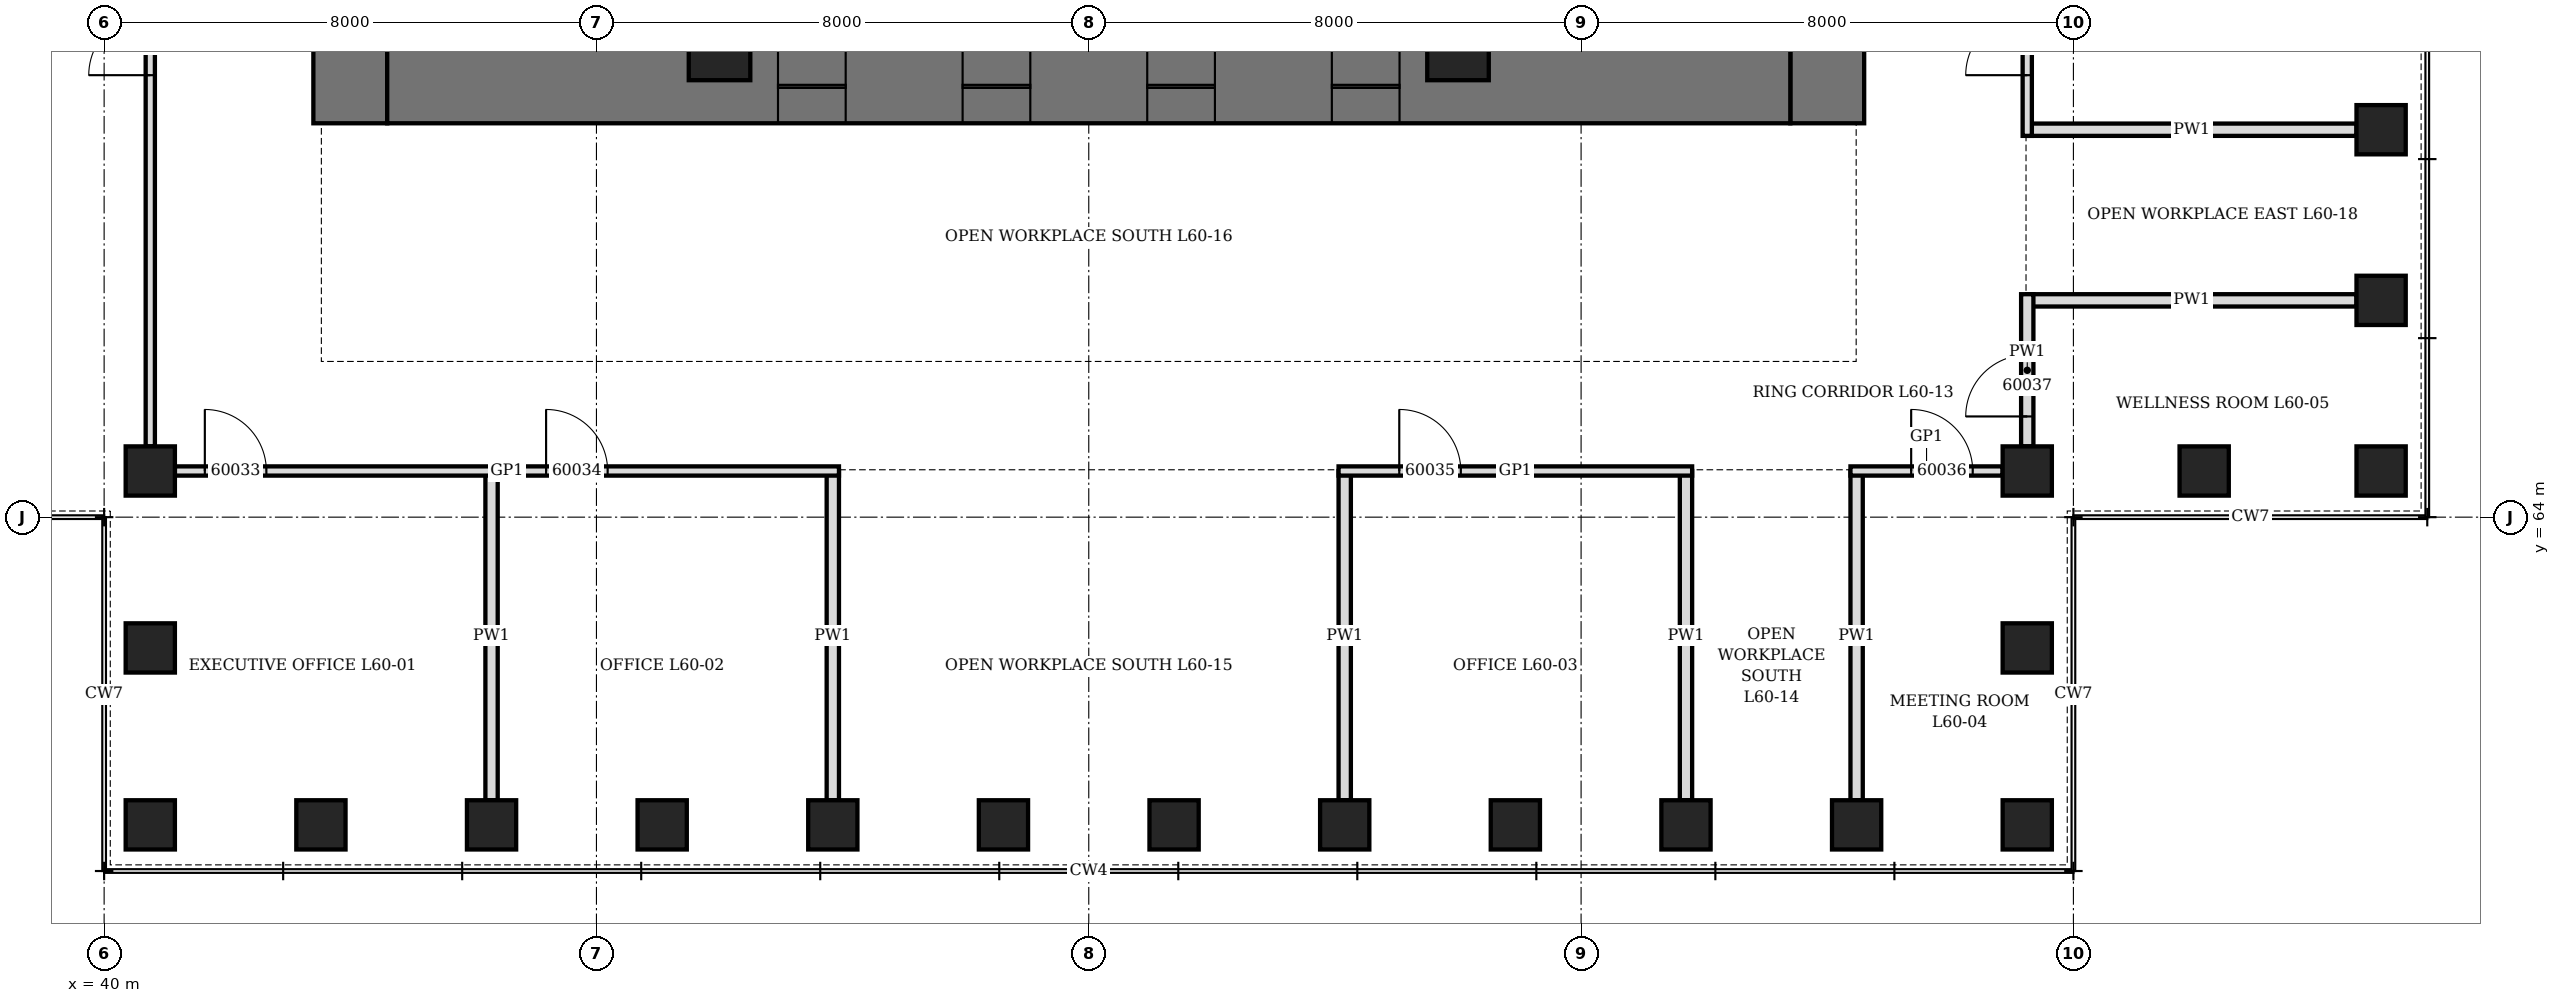
"""IFC4 building model, lengths in metres.
Left out: names, types, materials, properties, quantities, classifications, styles, units other than length and angle.
Written with IfcOpenShell. Run it as: python <this file> out.ifc"""

import sys

from ifc_helpers import new_model, si_unit, direction, frame, frame_2d, origin, origin_2d, place, context, subcontext, project, spatial, rectangle, hollow_rectangle, extrude, element, fill, save


model = new_model("IFC4")
c1 = context("Model", 3, precision=1e-05, world=origin(), true_north=direction((0.0, 1.0)))
c2 = subcontext(c1, "Body", "Model", "MODEL_VIEW")
j1 = project(units=[si_unit("LENGTHUNIT", "METRE"), si_unit("PLANEANGLEUNIT", "RADIAN")], contexts=[c1])
p1 = place(None, origin())
s1 = spatial("IfcSite", under=j1, at=p1, CompositionType="ELEMENT")
p2 = place(p1, origin())
s2 = spatial("IfcBuilding", under=s1, at=p2, CompositionType="ELEMENT")
p3 = place(p2, frame((0.0, 0.0, 267.1)))
s3 = spatial("IfcBuildingStorey", under=s2, at=p3, CompositionType="ELEMENT", Elevation=267.1)
for number, where, z_axis, x_axis in (
    (1, (40.75, 59.0, 0.0), (0.0, 0.0, 1.0), (1.0, 0.0, 0.0)),
    (2, (43.523, 59.0, 0.0), (0.0, 0.0, 1.0), (1.0, 0.0, 0.0)),
    (3, (46.295, 59.0, 0.0), (0.0, 0.0, 1.0), (1.0, 0.0, 0.0)),
    (4, (49.068, 59.0, 0.0), (0.0, 0.0, 1.0), (1.0, 0.0, 0.0)),
    (5, (51.841, 59.0, 0.0), (0.0, 0.0, 1.0), (1.0, 0.0, 0.0)),
    (6, (54.614, 59.0, 0.0), (0.0, 0.0, 1.0), (1.0, 0.0, 0.0)),
    (7, (57.386, 59.0, 0.0), (0.0, 0.0, 1.0), (1.0, 0.0, 0.0)),
    (8, (60.159, 59.0, 0.0), (0.0, 0.0, 1.0), (1.0, 0.0, 0.0)),
    (9, (62.932, 59.0, 0.0), (0.0, 0.0, 1.0), (1.0, 0.0, 0.0)),
    (10, (65.705, 59.0, 0.0), (0.0, 0.0, 1.0), (1.0, 0.0, 0.0)),
    (11, (68.477, 59.0, 0.0), (0.0, 0.0, 1.0), (1.0, 0.0, 0.0)),
    (12, (71.25, 59.0, 0.0), (0.0, 0.0, 1.0), (0.0, 1.0, 0.0)),
    (13, (71.25, 61.875, 0.0), (0.0, 0.0, 1.0), (0.0, 1.0, 0.0)),
    (14, (71.25, 64.75, 0.0), (0.0, 0.0, 1.0), (1.0, 0.0, 0.0)),
    (15, (74.125, 64.75, 0.0), (0.0, 0.0, 1.0), (1.0, 0.0, 0.0)),
    (16, (77.0, 64.75, 0.0), (0.0, 0.0, 1.0), (0.0, 1.0, 0.0)),
    (17, (77.0, 67.523, 0.0), (0.0, 0.0, 1.0), (0.0, 1.0, 0.0)),
    (18, (77.0, 70.295, 0.0), (0.0, 0.0, 1.0), (0.0, 1.0, 0.0)),
    (19, (40.75, 64.75, 0.0), (0.0, 0.0, 1.0), (0.0, 1.0, 0.0)),
    (20, (40.75, 61.875, 0.0), (0.0, 0.0, 1.0), (0.0, 1.0, 0.0)),
):
    element("IfcColumn", number, at=place(p3, frame(where, z_axis=z_axis, x_axis=x_axis)), inside=s3, PredefinedType="COLUMN", context=c2, shape_type="SweptSolid", body=[
        extrude(hollow_rectangle(XDim=0.8, YDim=0.8, WallThickness=0.1, at=origin_2d()), origin(), (0.0, 0.0, 1.0), 4.2),
    ])
p4 = place(p3, frame((44.0, 70.4, 0.0), z_axis=(0.0, 0.0, 1.0), x_axis=(0.0, 1.0, 0.0)))
e21 = element("IfcWall", 21, at=p4, inside=s3, PredefinedType="SHEAR", context=c2, shape_type="SweptSolid", body=[
    extrude(rectangle(XDim=19.2, YDim=1.2, at=frame_2d((9.6, 0.0))), origin(), (0.0, 0.0, 1.0), 4.2),
])
p5 = place(p4, frame((8.6, 0.0, 0.0)))
e22 = element("IfcOpeningElement", 22, at=p5, cuts=e21, PredefinedType="OPENING", context=c2, shape_type="SweptSolid", body=[
    extrude(rectangle(XDim=2.0, YDim=2.4, at=frame_2d((1.0, 1.2))), frame((0.0, 0.61, 0.0), z_axis=(0.0, -1.0, 0.0), x_axis=(1.0, 0.0, 0.0)), (0.0, 0.0, 1.0), 1.22),
])
p6 = place(p3, frame((68.0, 70.4, 0.0), z_axis=(0.0, 0.0, 1.0), x_axis=(0.0, 1.0, 0.0)))
e23 = element("IfcWall", 23, at=p6, inside=s3, PredefinedType="SHEAR", context=c2, shape_type="SweptSolid", body=[
    extrude(rectangle(XDim=19.2, YDim=1.2, at=frame_2d((9.6, 0.0))), origin(), (0.0, 0.0, 1.0), 4.2),
])
p7 = place(p6, frame((8.6, 0.0, 0.0)))
e24 = element("IfcOpeningElement", 24, at=p7, cuts=e23, PredefinedType="OPENING", context=c2, shape_type="SweptSolid", body=[
    extrude(rectangle(XDim=2.0, YDim=2.4, at=frame_2d((1.0, 1.2))), frame((0.0, 0.61, 0.0), z_axis=(0.0, -1.0, 0.0), x_axis=(1.0, 0.0, 0.0)), (0.0, 0.0, 1.0), 1.22),
])
p8 = place(p3, frame((44.6, 71.0, 0.0), z_axis=(0.0, 0.0, 1.0), x_axis=(1.0, 0.0, 0.0)))
e25 = element("IfcWall", 25, at=p8, inside=s3, PredefinedType="SHEAR", context=c2, shape_type="SweptSolid", body=[
    extrude(rectangle(XDim=22.8, YDim=1.2, at=frame_2d((11.4, 0.0))), origin(), (0.0, 0.0, 1.0), 4.2),
])
p9 = place(p8, frame((6.35, 0.0, 0.0)))
e26 = element("IfcOpeningElement", 26, at=p9, cuts=e25, PredefinedType="OPENING", context=c2, shape_type="SweptSolid", body=[
    extrude(rectangle(XDim=1.1, YDim=2.2, at=frame_2d((0.55, 1.1))), frame((0.0, 0.61, 0.0), z_axis=(0.0, -1.0, 0.0), x_axis=(1.0, 0.0, 0.0)), (0.0, 0.0, 1.0), 1.22),
])
p10 = place(p8, frame((9.35, 0.0, 0.0)))
e27 = element("IfcOpeningElement", 27, at=p10, cuts=e25, PredefinedType="OPENING", context=c2, shape_type="SweptSolid", body=[
    extrude(rectangle(XDim=1.1, YDim=2.2, at=frame_2d((0.55, 1.1))), frame((0.0, 0.61, 0.0), z_axis=(0.0, -1.0, 0.0), x_axis=(1.0, 0.0, 0.0)), (0.0, 0.0, 1.0), 1.22),
])
p11 = place(p8, frame((12.35, 0.0, 0.0)))
e28 = element("IfcOpeningElement", 28, at=p11, cuts=e25, PredefinedType="OPENING", context=c2, shape_type="SweptSolid", body=[
    extrude(rectangle(XDim=1.1, YDim=2.2, at=frame_2d((0.55, 1.1))), frame((0.0, 0.61, 0.0), z_axis=(0.0, -1.0, 0.0), x_axis=(1.0, 0.0, 0.0)), (0.0, 0.0, 1.0), 1.22),
])
p12 = place(p8, frame((15.35, 0.0, 0.0)))
e29 = element("IfcOpeningElement", 29, at=p12, cuts=e25, PredefinedType="OPENING", context=c2, shape_type="SweptSolid", body=[
    extrude(rectangle(XDim=1.1, YDim=2.2, at=frame_2d((0.55, 1.1))), frame((0.0, 0.61, 0.0), z_axis=(0.0, -1.0, 0.0), x_axis=(1.0, 0.0, 0.0)), (0.0, 0.0, 1.0), 1.22),
])
for number, where, z_axis, x_axis in (
    (30, (50.0, 71.6, 0.0), (0.0, 0.0, 1.0), (1.0, 0.0, 0.0)),
    (31, (62.0, 71.6, 0.0), (0.0, 0.0, 1.0), (1.0, 0.0, 0.0)),
):
    element("IfcColumn", number, at=place(p3, frame(where, z_axis=z_axis, x_axis=x_axis)), inside=s3, PredefinedType="COLUMN", context=c2, shape_type="SweptSolid", body=[
        extrude(hollow_rectangle(XDim=1.0, YDim=1.0, WallThickness=0.15, at=origin_2d()), origin(), (0.0, 0.0, 1.0), 4.2),
    ])
for number, where, z_axis, x_axis in (
    (32, (46.295, 59.4, 0.0), (0.0, 0.0, 1.0), (0.0, 1.0, 0.0)),
    (33, (51.841, 59.4, 0.0), (0.0, 0.0, 1.0), (0.0, 1.0, 0.0)),
    (34, (60.159, 59.4, 0.0), (0.0, 0.0, 1.0), (0.0, 1.0, 0.0)),
    (35, (65.705, 59.4, 0.0), (0.0, 0.0, 1.0), (0.0, 1.0, 0.0)),
    (36, (68.477, 59.4, 0.0), (0.0, 0.0, 1.0), (0.0, 1.0, 0.0)),
    (37, (71.25, 67.523, 0.0), (0.0, 0.0, 1.0), (1.0, 0.0, 0.0)),
    (38, (71.25, 70.295, 0.0), (0.0, 0.0, 1.0), (1.0, 0.0, 0.0)),
):
    element("IfcWall", number, at=place(p3, frame(where, z_axis=z_axis, x_axis=x_axis)), inside=s3, PredefinedType="PARTITIONING", context=c2, shape_type="SweptSolid", body=[
        extrude(rectangle(XDim=5.35, YDim=0.2, at=frame_2d((2.675, 0.0))), origin(), (0.0, 0.0, 1.0), 3.428),
    ])
p13 = place(p3, frame((41.15, 64.75, 0.0), z_axis=(0.0, 0.0, 1.0), x_axis=(1.0, 0.0, 0.0)))
e39 = element("IfcWall", 39, at=p13, inside=s3, PredefinedType="PARTITIONING", context=c2, shape_type="SweptSolid", body=[
    extrude(rectangle(XDim=10.791, YDim=0.15, at=frame_2d((5.396, 0.0))), origin(), (0.0, 0.0, 1.0), 4.04),
])
p14 = place(p13, frame((0.486, 0.0, 0.0)))
e40 = element("IfcOpeningElement", 40, at=p14, cuts=e39, PredefinedType="OPENING", context=c2, shape_type="SweptSolid", body=[
    extrude(rectangle(XDim=1.0, YDim=2.1, at=frame_2d((0.5, 1.05))), frame((0.0, 0.085, 0.0), z_axis=(0.0, -1.0, 0.0), x_axis=(1.0, 0.0, 0.0)), (0.0, 0.0, 1.0), 0.17),
])
p15 = place(p13, frame((6.032, 0.0, 0.0)))
e41 = element("IfcOpeningElement", 41, at=p15, cuts=e39, PredefinedType="OPENING", context=c2, shape_type="SweptSolid", body=[
    extrude(rectangle(XDim=1.0, YDim=2.1, at=frame_2d((0.5, 1.05))), frame((0.0, 0.085, 0.0), z_axis=(0.0, -1.0, 0.0), x_axis=(1.0, 0.0, 0.0)), (0.0, 0.0, 1.0), 0.17),
])
p16 = place(p3, frame((60.059, 64.75, 0.0), z_axis=(0.0, 0.0, 1.0), x_axis=(1.0, 0.0, 0.0)))
e42 = element("IfcWall", 42, at=p16, inside=s3, PredefinedType="PARTITIONING", context=c2, shape_type="SweptSolid", body=[
    extrude(rectangle(XDim=5.745, YDim=0.15, at=frame_2d((2.873, 0.0))), origin(), (0.0, 0.0, 1.0), 4.04),
])
p17 = place(p16, frame((0.986, 0.0, 0.0)))
e43 = element("IfcOpeningElement", 43, at=p17, cuts=e42, PredefinedType="OPENING", context=c2, shape_type="SweptSolid", body=[
    extrude(rectangle(XDim=1.0, YDim=2.1, at=frame_2d((0.5, 1.05))), frame((0.0, 0.085, 0.0), z_axis=(0.0, -1.0, 0.0), x_axis=(1.0, 0.0, 0.0)), (0.0, 0.0, 1.0), 0.17),
])
p18 = place(p3, frame((68.377, 64.75, 0.0), z_axis=(0.0, 0.0, 1.0), x_axis=(1.0, 0.0, 0.0)))
e44 = element("IfcWall", 44, at=p18, inside=s3, PredefinedType="PARTITIONING", context=c2, shape_type="SweptSolid", body=[
    extrude(rectangle(XDim=2.473, YDim=0.15, at=frame_2d((1.236, 0.0))), origin(), (0.0, 0.0, 1.0), 4.04),
])
p19 = place(p18, frame((0.986, 0.0, 0.0)))
e45 = element("IfcOpeningElement", 45, at=p19, cuts=e44, PredefinedType="OPENING", context=c2, shape_type="SweptSolid", body=[
    extrude(rectangle(XDim=1.0, YDim=2.4, at=frame_2d((0.5, 1.2))), frame((0.0, 0.085, 0.0), z_axis=(0.0, -1.0, 0.0), x_axis=(1.0, 0.0, 0.0)), (0.0, 0.0, 1.0), 0.17),
])
p20 = place(p3, frame((40.75, 65.15, 0.0), z_axis=(0.0, 0.0, 1.0), x_axis=(0.0, 1.0, 0.0)))
e46 = element("IfcWall", 46, at=p20, inside=s3, PredefinedType="PARTITIONING", context=c2, shape_type="SweptSolid", body=[
    extrude(rectangle(XDim=13.564, YDim=0.15, at=frame_2d((6.782, 0.0))), origin(), (0.0, 0.0, 1.0), 4.04),
])
p21 = place(p20, frame((6.032, 0.0, 0.0)))
e47 = element("IfcOpeningElement", 47, at=p21, cuts=e46, PredefinedType="OPENING", context=c2, shape_type="SweptSolid", body=[
    extrude(rectangle(XDim=1.0, YDim=2.4, at=frame_2d((0.5, 1.2))), frame((0.0, 0.085, 0.0), z_axis=(0.0, -1.0, 0.0), x_axis=(1.0, 0.0, 0.0)), (0.0, 0.0, 1.0), 0.17),
])
p22 = place(p3, frame((71.25, 70.196, 0.0), z_axis=(0.0, 0.0, 1.0), x_axis=(0.0, 1.0, 0.0)))
e48 = element("IfcWall", 48, at=p22, inside=s3, PredefinedType="PARTITIONING", context=c2, shape_type="SweptSolid", body=[
    extrude(rectangle(XDim=16.836, YDim=0.15, at=frame_2d((8.418, 0.0))), origin(), (0.0, 0.0, 1.0), 4.04),
])
p23 = place(p22, frame((0.986, 0.0, 0.0)))
e49 = element("IfcOpeningElement", 49, at=p23, cuts=e48, PredefinedType="OPENING", context=c2, shape_type="SweptSolid", body=[
    extrude(rectangle(XDim=1.0, YDim=2.1, at=frame_2d((0.5, 1.05))), frame((0.0, 0.085, 0.0), z_axis=(0.0, -1.0, 0.0), x_axis=(1.0, 0.0, 0.0)), (0.0, 0.0, 1.0), 0.17),
])
p24 = place(p22, frame((6.532, 0.0, 0.0)))
e50 = element("IfcOpeningElement", 50, at=p24, cuts=e48, PredefinedType="OPENING", context=c2, shape_type="SweptSolid", body=[
    extrude(rectangle(XDim=1.0, YDim=2.1, at=frame_2d((0.5, 1.05))), frame((0.0, 0.085, 0.0), z_axis=(0.0, -1.0, 0.0), x_axis=(1.0, 0.0, 0.0)), (0.0, 0.0, 1.0), 0.17),
])
p25 = place(p22, frame((12.077, 0.0, 0.0)))
e51 = element("IfcOpeningElement", 51, at=p25, cuts=e48, PredefinedType="OPENING", context=c2, shape_type="SweptSolid", body=[
    extrude(rectangle(XDim=1.0, YDim=2.1, at=frame_2d((0.5, 1.05))), frame((0.0, 0.085, 0.0), z_axis=(0.0, -1.0, 0.0), x_axis=(1.0, 0.0, 0.0)), (0.0, 0.0, 1.0), 0.17),
])
p26 = place(p3, frame((71.25, 65.15, 0.0), z_axis=(0.0, 0.0, 1.0), x_axis=(0.0, 1.0, 0.0)))
e52 = element("IfcWall", 52, at=p26, inside=s3, PredefinedType="PARTITIONING", context=c2, shape_type="SweptSolid", body=[
    extrude(rectangle(XDim=2.473, YDim=0.2, at=frame_2d((1.236, 0.0))), origin(), (0.0, 0.0, 1.0), 4.04),
])
p27 = place(p26, frame((0.486, 0.0, 0.0)))
e53 = element("IfcOpeningElement", 53, at=p27, cuts=e52, PredefinedType="OPENING", context=c2, shape_type="SweptSolid", body=[
    extrude(rectangle(XDim=1.0, YDim=2.1, at=frame_2d((0.5, 1.05))), frame((0.0, 0.11, 0.0), z_axis=(0.0, -1.0, 0.0), x_axis=(1.0, 0.0, 0.0)), (0.0, 0.0, 1.0), 0.22),
])
p28 = place(p9, origin())
e54 = element("IfcDoor", 54, at=p28, inside=s3, OperationType="SLIDING_TO_LEFT", PredefinedType="DOOR", context=c2, shape_type="SweptSolid", body=[
    extrude(rectangle(XDim=1.1, YDim=2.2, at=frame_2d((0.55, 1.1))), frame((0.0, 0.35, 0.0), z_axis=(0.0, -1.0, 0.0), x_axis=(1.0, 0.0, 0.0)), (0.0, 0.0, 1.0), 0.7),
])
fill(e26, e54)
p29 = place(p10, origin())
e55 = element("IfcDoor", 55, at=p29, inside=s3, OperationType="SLIDING_TO_LEFT", PredefinedType="DOOR", context=c2, shape_type="SweptSolid", body=[
    extrude(rectangle(XDim=1.1, YDim=2.2, at=frame_2d((0.55, 1.1))), frame((0.0, 0.35, 0.0), z_axis=(0.0, -1.0, 0.0), x_axis=(1.0, 0.0, 0.0)), (0.0, 0.0, 1.0), 0.7),
])
fill(e27, e55)
p30 = place(p11, origin())
e56 = element("IfcDoor", 56, at=p30, inside=s3, OperationType="SLIDING_TO_LEFT", PredefinedType="DOOR", context=c2, shape_type="SweptSolid", body=[
    extrude(rectangle(XDim=1.1, YDim=2.2, at=frame_2d((0.55, 1.1))), frame((0.0, 0.35, 0.0), z_axis=(0.0, -1.0, 0.0), x_axis=(1.0, 0.0, 0.0)), (0.0, 0.0, 1.0), 0.7),
])
fill(e28, e56)
p31 = place(p12, origin())
e57 = element("IfcDoor", 57, at=p31, inside=s3, OperationType="SLIDING_TO_LEFT", PredefinedType="DOOR", context=c2, shape_type="SweptSolid", body=[
    extrude(rectangle(XDim=1.1, YDim=2.2, at=frame_2d((0.55, 1.1))), frame((0.0, 0.35, 0.0), z_axis=(0.0, -1.0, 0.0), x_axis=(1.0, 0.0, 0.0)), (0.0, 0.0, 1.0), 0.7),
])
fill(e29, e57)
p32 = place(p14, origin())
e58 = element("IfcDoor", 58, at=p32, inside=s3, OperationType="SINGLE_SWING_LEFT", PredefinedType="DOOR", context=c2, shape_type="SweptSolid", body=[
    extrude(rectangle(XDim=1.0, YDim=2.1, at=frame_2d((0.5, 1.05))), frame((0.0, 0.075, 0.0), z_axis=(0.0, -1.0, 0.0), x_axis=(1.0, 0.0, 0.0)), (0.0, 0.0, 1.0), 0.149),
])
fill(e40, e58)
p33 = place(p15, origin())
e59 = element("IfcDoor", 59, at=p33, inside=s3, OperationType="SINGLE_SWING_LEFT", PredefinedType="DOOR", context=c2, shape_type="SweptSolid", body=[
    extrude(rectangle(XDim=1.0, YDim=2.1, at=frame_2d((0.5, 1.05))), frame((0.0, 0.075, 0.0), z_axis=(0.0, -1.0, 0.0), x_axis=(1.0, 0.0, 0.0)), (0.0, 0.0, 1.0), 0.149),
])
fill(e41, e59)
p34 = place(p17, origin())
e60 = element("IfcDoor", 60, at=p34, inside=s3, OperationType="SINGLE_SWING_LEFT", PredefinedType="DOOR", context=c2, shape_type="SweptSolid", body=[
    extrude(rectangle(XDim=1.0, YDim=2.1, at=frame_2d((0.5, 1.05))), frame((0.0, 0.075, 0.0), z_axis=(0.0, -1.0, 0.0), x_axis=(1.0, 0.0, 0.0)), (0.0, 0.0, 1.0), 0.149),
])
fill(e43, e60)
p35 = place(p19, origin())
e61 = element("IfcDoor", 61, at=p35, inside=s3, OperationType="SINGLE_SWING_RIGHT", PredefinedType="DOOR", context=c2, shape_type="SweptSolid", body=[
    extrude(rectangle(XDim=1.0, YDim=2.4, at=frame_2d((0.5, 1.2))), frame((0.0, 0.075, 0.0), z_axis=(0.0, -1.0, 0.0), x_axis=(1.0, 0.0, 0.0)), (0.0, 0.0, 1.0), 0.149),
])
fill(e45, e61)
p36 = place(p27, origin())
e62 = element("IfcDoor", 62, at=p36, inside=s3, OperationType="SINGLE_SWING_LEFT", PredefinedType="DOOR", context=c2, shape_type="SweptSolid", body=[
    extrude(rectangle(XDim=1.0, YDim=2.1, at=frame_2d((0.5, 1.05))), frame((0.0, 0.1, 0.0), z_axis=(0.0, -1.0, 0.0), x_axis=(1.0, 0.0, 0.0)), (0.0, 0.0, 1.0), 0.199),
])
fill(e53, e62)
p37 = place(p23, origin())
e63 = element("IfcDoor", 63, at=p37, inside=s3, OperationType="SINGLE_SWING_LEFT", PredefinedType="DOOR", context=c2, shape_type="SweptSolid", body=[
    extrude(rectangle(XDim=1.0, YDim=2.1, at=frame_2d((0.5, 1.05))), frame((0.0, 0.075, 0.0), z_axis=(0.0, -1.0, 0.0), x_axis=(1.0, 0.0, 0.0)), (0.0, 0.0, 1.0), 0.149),
])
fill(e49, e63)
p38 = place(p21, origin())
e64 = element("IfcDoor", 64, at=p38, inside=s3, OperationType="SINGLE_SWING_RIGHT", PredefinedType="DOOR", context=c2, shape_type="SweptSolid", body=[
    extrude(rectangle(XDim=1.0, YDim=2.4, at=frame_2d((0.5, 1.2))), frame((0.0, 0.075, 0.0), z_axis=(0.0, -1.0, 0.0), x_axis=(1.0, 0.0, 0.0)), (0.0, 0.0, 1.0), 0.149),
])
fill(e47, e64)
save(model, sys.argv[1])
